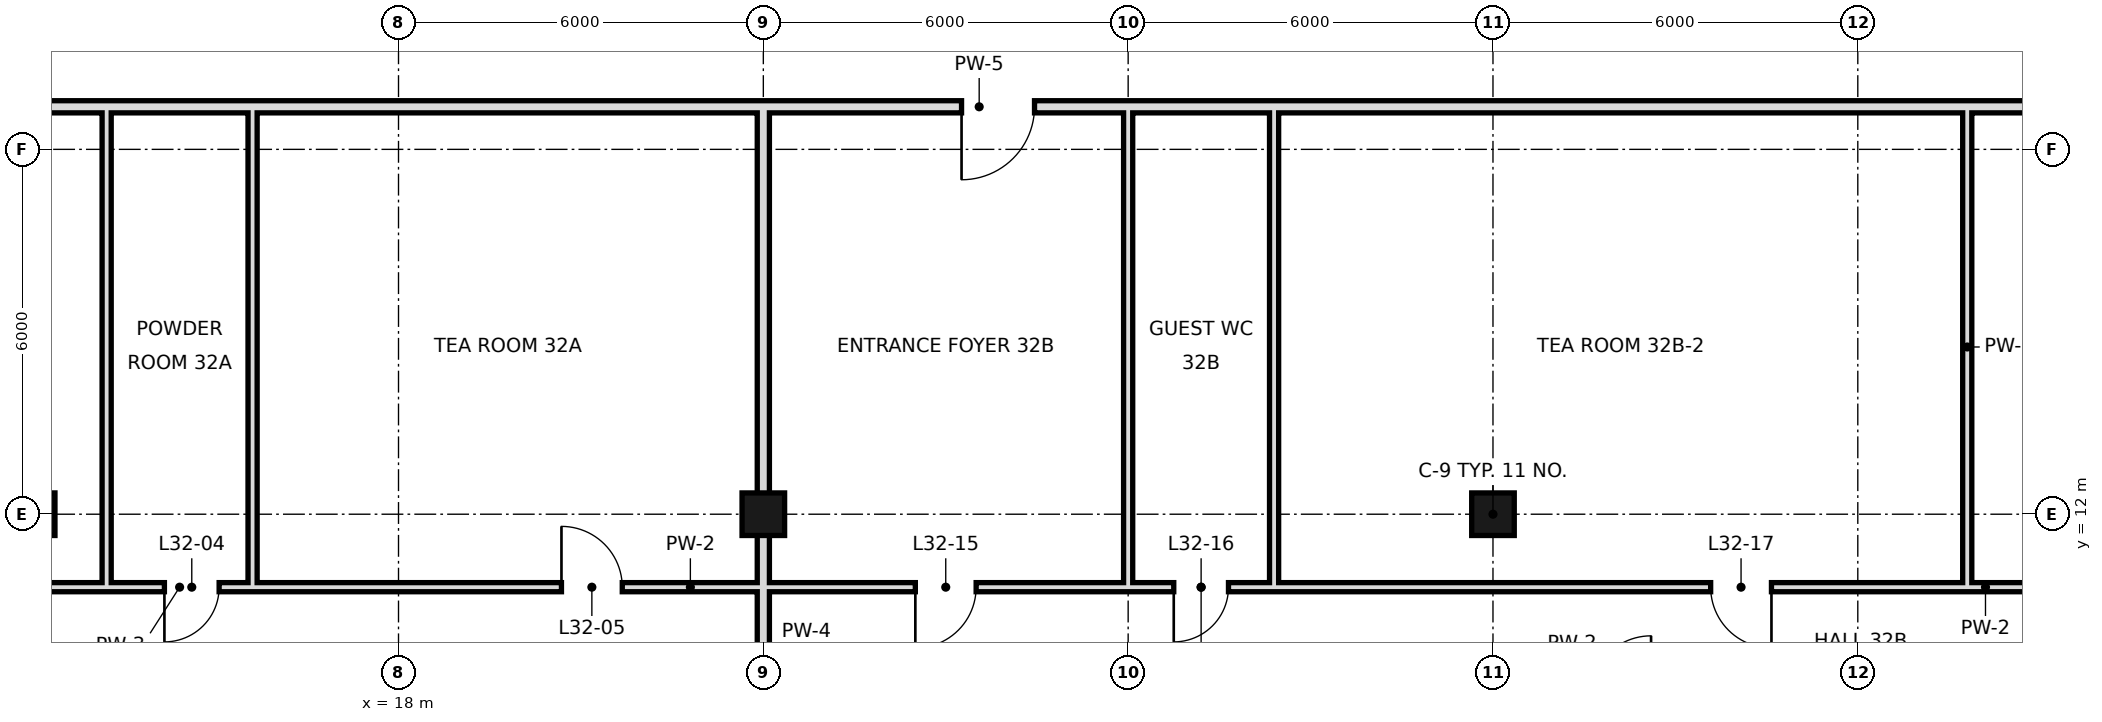
"""IFC4 building model, lengths in metres.
Left out: names, types, materials, properties, quantities, classifications, styles, units other than length and angle.
Written with IfcOpenShell. Run it as: python <this file> out.ifc"""

import sys

from ifc_helpers import new_model, si_unit, direction, frame, frame_2d, origin, origin_2d, place, context, subcontext, project, spatial, rectangle, hollow_rectangle, extrude, element, fill, save


model = new_model("IFC4")
c1 = context("Model", 3, precision=1e-05, world=origin(), true_north=direction((0.0, 1.0)))
c2 = subcontext(c1, "Body", "Model", "MODEL_VIEW")
j1 = project(units=[si_unit("LENGTHUNIT", "METRE"), si_unit("PLANEANGLEUNIT", "RADIAN")], contexts=[c1])
p1 = place(None, origin())
s1 = spatial("IfcSite", under=j1, at=p1, CompositionType="ELEMENT")
p2 = place(p1, origin())
s2 = spatial("IfcBuilding", under=s1, at=p2, CompositionType="ELEMENT")
p3 = place(p2, frame((0.0, 0.0, 143.8)))
s3 = spatial("IfcBuildingStorey", under=s2, at=p3, CompositionType="ELEMENT", Elevation=143.8)
for number, where, z_axis, x_axis in (
    (1, (12.0, 12.0, 0.0), (0.0, 0.0, 1.0), (1.0, 0.0, 0.0)),
    (2, (24.0, 12.0, 0.0), (0.0, 0.0, 1.0), (1.0, 0.0, 0.0)),
    (3, (36.0, 12.0, 0.0), (0.0, 0.0, 1.0), (1.0, 0.0, 0.0)),
):
    element("IfcColumn", number, at=place(p3, frame(where, z_axis=z_axis, x_axis=x_axis)), inside=s3, PredefinedType="COLUMN", context=c2, shape_type="SweptSolid", body=[
        extrude(hollow_rectangle(XDim=0.7, YDim=0.7, WallThickness=0.036, at=origin_2d()), origin(), (0.0, 0.0, 1.0), 3.6),
    ])
for number, where, z_axis, x_axis in (
    (4, (13.2, 10.8, 0.0), (0.0, 0.0, 1.0), (0.0, 1.0, 0.0)),
    (5, (15.6, 10.8, 0.0), (0.0, 0.0, 1.0), (0.0, 1.0, 0.0)),
):
    element("IfcWall", number, at=place(p3, frame(where, z_axis=z_axis, x_axis=x_axis)), inside=s3, PredefinedType="PARTITIONING", context=c2, shape_type="SweptSolid", body=[
        extrude(rectangle(XDim=7.9, YDim=0.15, at=frame_2d((3.95, 0.0))), origin(), (0.0, 0.0, 1.0), 3.42),
    ])
p4 = place(p3, frame((24.0, 0.0, 0.0), z_axis=(0.0, 0.0, 1.0), x_axis=(0.0, 1.0, 0.0)))
e6 = element("IfcWall", 6, at=p4, inside=s3, PredefinedType="SOLIDWALL", context=c2, shape_type="SweptSolid", body=[
    extrude(rectangle(XDim=18.7, YDim=0.2, at=frame_2d((9.35, 0.0))), origin(), (0.0, 0.0, 1.0), 2.72),
])
p5 = place(p3, frame((30.0, 10.8, 0.0), z_axis=(0.0, 0.0, 1.0), x_axis=(0.0, 1.0, 0.0)))
e7 = element("IfcWall", 7, at=p5, inside=s3, PredefinedType="PARTITIONING", context=c2, shape_type="SweptSolid", body=[
    extrude(rectangle(XDim=7.9, YDim=0.15, at=frame_2d((3.95, 0.0))), origin(), (0.0, 0.0, 1.0), 2.72),
])
for number, where, z_axis, x_axis in (
    (8, (32.4, 10.8, 0.0), (0.0, 0.0, 1.0), (0.0, 1.0, 0.0)),
    (9, (43.8, 10.8, 0.0), (0.0, 0.0, 1.0), (0.0, 1.0, 0.0)),
):
    element("IfcWall", number, at=place(p3, frame(where, z_axis=z_axis, x_axis=x_axis)), inside=s3, PredefinedType="PARTITIONING", context=c2, shape_type="SweptSolid", body=[
        extrude(rectangle(XDim=7.9, YDim=0.15, at=frame_2d((3.95, 0.0))), origin(), (0.0, 0.0, 1.0), 3.42),
    ])
p6 = place(p3, frame((-1.8, 10.8, 0.0), z_axis=(0.0, 0.0, 1.0), x_axis=(1.0, 0.0, 0.0)))
e10 = element("IfcWall", 10, at=p6, inside=s3, PredefinedType="PARTITIONING", context=c2, shape_type="SweptSolid", body=[
    extrude(rectangle(XDim=15.0, YDim=0.15, at=frame_2d((7.5, 0.0))), origin(), (0.0, 0.0, 1.0), 3.42),
])
p7 = place(p6, frame((11.5, 0.0, 0.0)))
e11 = element("IfcOpeningElement", 11, at=p7, cuts=e10, PredefinedType="OPENING", context=c2, shape_type="SweptSolid", body=[
    extrude(rectangle(XDim=1.0, YDim=2.4, at=frame_2d((0.5, 1.2))), frame((0.0, 0.085, 0.0), z_axis=(0.0, -1.0, 0.0), x_axis=(1.0, 0.0, 0.0)), (0.0, 0.0, 1.0), 0.17),
])
p8 = place(p6, frame((5.5, 0.0, 0.0)))
e12 = element("IfcOpeningElement", 12, at=p8, cuts=e10, PredefinedType="OPENING", context=c2, shape_type="SweptSolid", body=[
    extrude(rectangle(XDim=1.0, YDim=2.4, at=frame_2d((0.5, 1.2))), frame((0.0, 0.085, 0.0), z_axis=(0.0, -1.0, 0.0), x_axis=(1.0, 0.0, 0.0)), (0.0, 0.0, 1.0), 0.17),
])
p9 = place(p3, frame((15.6, 10.8, 0.0), z_axis=(0.0, 0.0, 1.0), x_axis=(1.0, 0.0, 0.0)))
e13 = element("IfcWall", 13, at=p9, inside=s3, PredefinedType="PARTITIONING", context=c2, shape_type="SweptSolid", body=[
    extrude(rectangle(XDim=14.4, YDim=0.15, at=frame_2d((7.2, 0.0))), origin(), (0.0, 0.0, 1.0), 3.42),
])
p10 = place(p9, frame((5.08, 0.0, 0.0)))
e14 = element("IfcOpeningElement", 14, at=p10, cuts=e13, PredefinedType="OPENING", context=c2, shape_type="SweptSolid", body=[
    extrude(rectangle(XDim=1.0, YDim=2.4, at=frame_2d((0.5, 1.2))), frame((0.0, 0.085, 0.0), z_axis=(0.0, -1.0, 0.0), x_axis=(1.0, 0.0, 0.0)), (0.0, 0.0, 1.0), 0.17),
])
p11 = place(p9, frame((10.9, 0.0, 0.0)))
e15 = element("IfcOpeningElement", 15, at=p11, cuts=e13, PredefinedType="OPENING", context=c2, shape_type="SweptSolid", body=[
    extrude(rectangle(XDim=1.0, YDim=2.4, at=frame_2d((0.5, 1.2))), frame((0.0, 0.085, 0.0), z_axis=(0.0, -1.0, 0.0), x_axis=(1.0, 0.0, 0.0)), (0.0, 0.0, 1.0), 0.17),
])
p12 = place(p3, frame((32.4, 10.8, 0.0), z_axis=(0.0, 0.0, 1.0), x_axis=(1.0, 0.0, 0.0)))
e16 = element("IfcWall", 16, at=p12, inside=s3, PredefinedType="PARTITIONING", context=c2, shape_type="SweptSolid", body=[
    extrude(rectangle(XDim=23.4, YDim=0.15, at=frame_2d((11.7, 0.0))), origin(), (0.0, 0.0, 1.0), 3.42),
])
p13 = place(p12, frame((7.18, 0.0, 0.0)))
e17 = element("IfcOpeningElement", 17, at=p13, cuts=e16, PredefinedType="OPENING", context=c2, shape_type="SweptSolid", body=[
    extrude(rectangle(XDim=1.0, YDim=2.4, at=frame_2d((0.5, 1.2))), frame((0.0, 0.085, 0.0), z_axis=(0.0, -1.0, 0.0), x_axis=(1.0, 0.0, 0.0)), (0.0, 0.0, 1.0), 0.17),
])
p14 = place(p12, frame((16.9, 0.0, 0.0)))
e18 = element("IfcOpeningElement", 18, at=p14, cuts=e16, PredefinedType="OPENING", context=c2, shape_type="SweptSolid", body=[
    extrude(rectangle(XDim=1.0, YDim=2.4, at=frame_2d((0.5, 1.2))), frame((0.0, 0.085, 0.0), z_axis=(0.0, -1.0, 0.0), x_axis=(1.0, 0.0, 0.0)), (0.0, 0.0, 1.0), 0.17),
])
p15 = place(p3, frame((13.2, 10.8, 0.0), z_axis=(0.0, 0.0, 1.0), x_axis=(1.0, 0.0, 0.0)))
e19 = element("IfcWall", 19, at=p15, inside=s3, PredefinedType="PARTITIONING", context=c2, shape_type="SweptSolid", body=[
    extrude(rectangle(XDim=2.4, YDim=0.15, at=frame_2d((1.2, 0.0))), origin(), (0.0, 0.0, 1.0), 3.42),
])
p16 = place(p15, frame((0.95, 0.0, 0.0)))
e20 = element("IfcOpeningElement", 20, at=p16, cuts=e19, PredefinedType="OPENING", context=c2, shape_type="SweptSolid", body=[
    extrude(rectangle(XDim=0.9, YDim=2.4, at=frame_2d((0.45, 1.2))), frame((0.0, 0.085, 0.0), z_axis=(0.0, -1.0, 0.0), x_axis=(1.0, 0.0, 0.0)), (0.0, 0.0, 1.0), 0.17),
])
p17 = place(p3, frame((30.0, 10.8, 0.0), z_axis=(0.0, 0.0, 1.0), x_axis=(1.0, 0.0, 0.0)))
e21 = element("IfcWall", 21, at=p17, inside=s3, PredefinedType="PARTITIONING", context=c2, shape_type="SweptSolid", body=[
    extrude(rectangle(XDim=2.4, YDim=0.15, at=frame_2d((1.2, 0.0))), origin(), (0.0, 0.0, 1.0), 3.42),
])
p18 = place(p17, frame((0.75, 0.0, 0.0)))
e22 = element("IfcOpeningElement", 22, at=p18, cuts=e21, PredefinedType="OPENING", context=c2, shape_type="SweptSolid", body=[
    extrude(rectangle(XDim=0.9, YDim=2.4, at=frame_2d((0.45, 1.2))), frame((0.0, 0.085, 0.0), z_axis=(0.0, -1.0, 0.0), x_axis=(1.0, 0.0, 0.0)), (0.0, 0.0, 1.0), 0.17),
])
p19 = place(p3, frame((3.1, 18.7, 0.0), z_axis=(0.0, 0.0, 1.0), x_axis=(1.0, 0.0, 0.0)))
e23 = element("IfcWall", 23, at=p19, inside=s3, PredefinedType="SOLIDWALL", context=c2, shape_type="SweptSolid", body=[
    extrude(rectangle(XDim=41.8, YDim=0.2, at=frame_2d((20.9, 0.0))), origin(), (0.0, 0.0, 1.0), 2.72),
])
p20 = place(p19, frame((5.64, 0.0, 0.0)))
e24 = element("IfcOpeningElement", 24, at=p20, cuts=e23, PredefinedType="OPENING", context=c2, shape_type="SweptSolid", body=[
    extrude(rectangle(XDim=1.2, YDim=2.4, at=frame_2d((0.6, 1.2))), frame((0.0, 0.11, 0.0), z_axis=(0.0, -1.0, 0.0), x_axis=(1.0, 0.0, 0.0)), (0.0, 0.0, 1.0), 0.22),
])
p21 = place(p19, frame((24.16, 0.0, 0.0)))
e25 = element("IfcOpeningElement", 25, at=p21, cuts=e23, PredefinedType="OPENING", context=c2, shape_type="SweptSolid", body=[
    extrude(rectangle(XDim=1.2, YDim=2.4, at=frame_2d((0.6, 1.2))), frame((0.0, 0.11, 0.0), z_axis=(0.0, -1.0, 0.0), x_axis=(1.0, 0.0, 0.0)), (0.0, 0.0, 1.0), 0.22),
])
p22 = place(p16, frame((0.9, 0.0, 0.0), z_axis=(0.0, 0.0, 1.0), x_axis=(-1.0, 0.0, 0.0)))
e26 = element("IfcDoor", 26, at=p22, inside=s3, OperationType="SINGLE_SWING_RIGHT", PredefinedType="DOOR", context=c2, shape_type="SweptSolid", body=[
    extrude(rectangle(XDim=0.9, YDim=2.4, at=frame_2d((0.45, 1.2))), frame((0.0, 0.025, 0.0), z_axis=(0.0, -1.0, 0.0), x_axis=(1.0, 0.0, 0.0)), (0.0, 0.0, 1.0), 0.05),
])
fill(e20, e26)
p23 = place(p10, origin())
e27 = element("IfcDoor", 27, at=p23, inside=s3, OperationType="SINGLE_SWING_LEFT", PredefinedType="DOOR", context=c2, shape_type="SweptSolid", body=[
    extrude(rectangle(XDim=1.0, YDim=2.4, at=frame_2d((0.5, 1.2))), frame((0.0, 0.025, 0.0), z_axis=(0.0, -1.0, 0.0), x_axis=(1.0, 0.0, 0.0)), (0.0, 0.0, 1.0), 0.05),
])
fill(e14, e27)
p24 = place(p11, frame((1.0, 0.0, 0.0), z_axis=(0.0, 0.0, 1.0), x_axis=(-1.0, 0.0, 0.0)))
e28 = element("IfcDoor", 28, at=p24, inside=s3, OperationType="SINGLE_SWING_RIGHT", PredefinedType="DOOR", context=c2, shape_type="SweptSolid", body=[
    extrude(rectangle(XDim=1.0, YDim=2.4, at=frame_2d((0.5, 1.2))), frame((0.0, 0.025, 0.0), z_axis=(0.0, -1.0, 0.0), x_axis=(1.0, 0.0, 0.0)), (0.0, 0.0, 1.0), 0.05),
])
fill(e15, e28)
p25 = place(p18, frame((0.9, 0.0, 0.0), z_axis=(0.0, 0.0, 1.0), x_axis=(-1.0, 0.0, 0.0)))
e29 = element("IfcDoor", 29, at=p25, inside=s3, OperationType="SINGLE_SWING_RIGHT", PredefinedType="DOOR", context=c2, shape_type="SweptSolid", body=[
    extrude(rectangle(XDim=0.9, YDim=2.4, at=frame_2d((0.45, 1.2))), frame((0.0, 0.025, 0.0), z_axis=(0.0, -1.0, 0.0), x_axis=(1.0, 0.0, 0.0)), (0.0, 0.0, 1.0), 0.05),
])
fill(e22, e29)
p26 = place(p13, origin())
e30 = element("IfcDoor", 30, at=p26, inside=s3, OperationType="SINGLE_SWING_RIGHT", PredefinedType="DOOR", context=c2, shape_type="SweptSolid", body=[
    extrude(rectangle(XDim=1.0, YDim=2.4, at=frame_2d((0.5, 1.2))), frame((0.0, 0.025, 0.0), z_axis=(0.0, -1.0, 0.0), x_axis=(1.0, 0.0, 0.0)), (0.0, 0.0, 1.0), 0.05),
])
fill(e17, e30)
p27 = place(p21, frame((1.2, 0.0, 0.0), z_axis=(0.0, 0.0, 1.0), x_axis=(-1.0, 0.0, 0.0)))
e31 = element("IfcDoor", 31, at=p27, inside=s3, OperationType="SINGLE_SWING_RIGHT", PredefinedType="DOOR", context=c2, shape_type="SweptSolid", body=[
    extrude(rectangle(XDim=1.2, YDim=2.4, at=frame_2d((0.6, 1.2))), frame((0.0, 0.025, 0.0), z_axis=(0.0, -1.0, 0.0), x_axis=(1.0, 0.0, 0.0)), (0.0, 0.0, 1.0), 0.05),
])
fill(e25, e31)
save(model, sys.argv[1])
